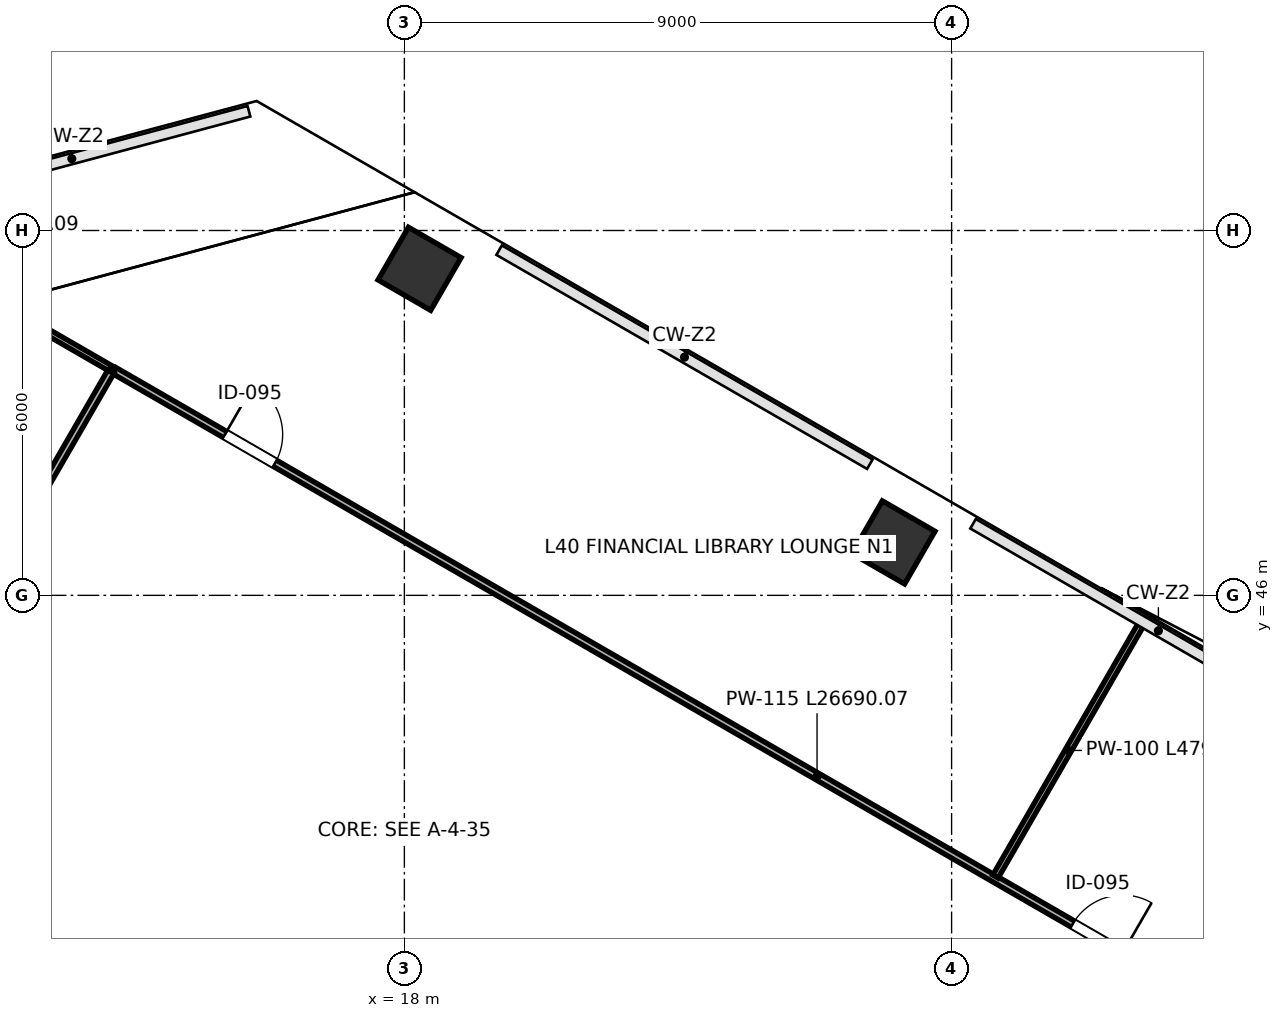
"""IFC4 building model, lengths in metres.
Left out: names, types, materials, properties, quantities, classifications, styles, units other than length and angle.
Written with IfcOpenShell. Run it as: python <this file> out.ifc"""

import sys

from ifc_helpers import new_model, si_unit, direction, frame, frame_2d, origin, origin_2d, place, context, subcontext, project, spatial, rectangle, extrude, source, transform, mapped, element, fill, save


model = new_model("IFC4")
c1 = context("Model", 3, precision=1e-05, world=origin(), true_north=direction((0.0, 1.0)))
c2 = subcontext(c1, "Body", "Model", "MODEL_VIEW")
j1 = project(units=[si_unit("LENGTHUNIT", "METRE"), si_unit("PLANEANGLEUNIT", "RADIAN")], contexts=[c1])
p1 = place(None, origin())
s1 = spatial("IfcSite", under=j1, at=p1, CompositionType="ELEMENT")
p2 = place(p1, origin())
s2 = spatial("IfcBuilding", under=s1, at=p2, CompositionType="ELEMENT")
p3 = place(p2, frame((0.0, 0.0, 179.2)))
s3 = spatial("IfcBuildingStorey", under=s2, at=p3, CompositionType="ELEMENT", Elevation=179.2)
m1 = source(origin(), c2, "Body", "SweptSolid", [
    extrude(rectangle(XDim=1.0, YDim=1.0, at=origin_2d()), origin(), (0.0, 0.0, 1.0), 4.198),
])
for number, where, z_axis, x_axis in (
    (1, (18.25, 51.37, 0.001), (0.0, 0.0, 1.0), (-0.866, 0.5, 0.0)),
    (2, (26.044, 46.87, 0.001), (0.0, 0.0, 1.0), (-0.866, 0.5, 0.0)),
):
    element("IfcColumn", number, at=place(p3, frame(where, z_axis=z_axis, x_axis=x_axis)), inside=s3, PredefinedType="COLUMN", context=c2, shape_type="MappedRepresentation", body=[
        mapped(m1, transform((0.0, 0.0, 0.0), scale=1.0)),
    ])
p4 = place(p3, frame((13.23, 49.696, 0.0), z_axis=(0.0, 0.0, 1.0), x_axis=(0.866026251752, -0.499998531275, 0.0)))
e3 = element("IfcWall", 3, at=p4, inside=s3, PredefinedType="PARTITIONING", context=c2, shape_type="SweptSolid", body=[
    extrude(rectangle(XDim=26.69, YDim=0.115, at=frame_2d((13.345, 0.0))), origin(), (0.0, 0.0, 1.0), 3.96),
])
p5 = place(p4, frame((2.1, 0.0, 0.0)))
e4 = element("IfcOpeningElement", 4, at=p5, cuts=e3, PredefinedType="OPENING", context=c2, shape_type="SweptSolid", body=[
    extrude(rectangle(XDim=0.95, YDim=2.15, at=frame_2d((0.475, 1.075))), frame((0.0, 0.067, 0.0), z_axis=(0.0, -1.0, 0.0), x_axis=(1.0, 0.0, 0.0)), (0.0, 0.0, 1.0), 0.135),
])
p6 = place(p4, frame((18.2, 0.0, 0.0)))
e5 = element("IfcOpeningElement", 5, at=p6, cuts=e3, PredefinedType="OPENING", context=c2, shape_type="SweptSolid", body=[
    extrude(rectangle(XDim=0.95, YDim=2.15, at=frame_2d((0.475, 1.075))), frame((0.0, 0.067, 0.0), z_axis=(0.0, -1.0, 0.0), x_axis=(1.0, 0.0, 0.0)), (0.0, 0.0, 1.0), 0.135),
])
p7 = place(p3, frame((27.721, 41.375, 0.0), z_axis=(0.0, 0.0, 1.0), x_axis=(0.500009234706, 0.866020072059, 0.0)))
e6 = element("IfcWall", 6, at=p7, inside=s3, PredefinedType="PARTITIONING", context=c2, shape_type="SweptSolid", body=[
    extrude(rectangle(XDim=4.79, YDim=0.1, at=frame_2d((2.395, 0.0))), origin(), (0.0, 0.0, 1.0), 3.195),
])
p8 = place(p3, frame((1.625, 29.676, 0.0), z_axis=(0.0, 0.0, 1.0), x_axis=(0.500002707681, 0.866023840498, 0.0)))
e7 = element("IfcWall", 7, at=p8, inside=s3, PredefinedType="PARTITIONING", context=c2, shape_type="SweptSolid", body=[
    extrude(rectangle(XDim=23.1, YDim=0.115, at=frame_2d((11.55, 0.0))), origin(), (0.0, 0.0, 1.0), 3.96),
])
p9 = place(p8, frame((1.3, 0.0, 0.0)))
e8 = element("IfcOpeningElement", 8, at=p9, cuts=e7, PredefinedType="OPENING", context=c2, shape_type="SweptSolid", body=[
    extrude(rectangle(XDim=0.95, YDim=2.15, at=frame_2d((0.475, 1.075))), frame((0.0, 0.067, 0.0), z_axis=(0.0, -1.0, 0.0), x_axis=(1.0, 0.0, 0.0)), (0.0, 0.0, 1.0), 0.135),
])
p10 = place(p8, frame((13.8, 0.0, 0.0)))
e9 = element("IfcOpeningElement", 9, at=p10, cuts=e7, PredefinedType="OPENING", context=c2, shape_type="SweptSolid", body=[
    extrude(rectangle(XDim=0.95, YDim=2.15, at=frame_2d((0.475, 1.075))), frame((0.0, 0.067, 0.0), z_axis=(0.0, -1.0, 0.0), x_axis=(1.0, 0.0, 0.0)), (0.0, 0.0, 1.0), 0.135),
])
p11 = place(p3, frame((9.324, 51.951, 0.0), z_axis=(0.0, 0.0, 1.0), x_axis=(0.866036909293, -0.499980071345, 0.0)))
e10 = element("IfcWall", 10, at=p11, inside=s3, PredefinedType="PARTITIONING", context=c2, shape_type="SweptSolid", body=[
    extrude(rectangle(XDim=4.43, YDim=0.1, at=frame_2d((2.215, 0.0))), origin(), (0.0, 0.0, 1.0), 3.96),
])
m2 = source(origin(), c2, "Body", "SweptSolid", [
    extrude(rectangle(XDim=0.95, YDim=2.15, at=frame_2d((0.475, 1.075))), frame((0.0, 0.025, 0.0), z_axis=(0.0, -1.0, 0.0), x_axis=(1.0, 0.0, 0.0)), (0.0, 0.0, 1.0), 0.05),
])
p12 = place(p5, origin())
e11 = element("IfcDoor", 11, at=p12, inside=s3, OperationType="SINGLE_SWING_LEFT", PredefinedType="DOOR", context=c2, shape_type="MappedRepresentation", body=[
    mapped(m2, transform((0.0, 0.0, 0.0), scale=1.0)),
])
fill(e4, e11)
p13 = place(p6, origin())
e12 = element("IfcDoor", 12, at=p13, inside=s3, OperationType="SINGLE_SWING_RIGHT", PredefinedType="DOOR", context=c2, shape_type="MappedRepresentation", body=[
    mapped(m2, transform((0.0, 0.0, 0.0), scale=1.0)),
])
fill(e5, e12)
save(model, sys.argv[1])
